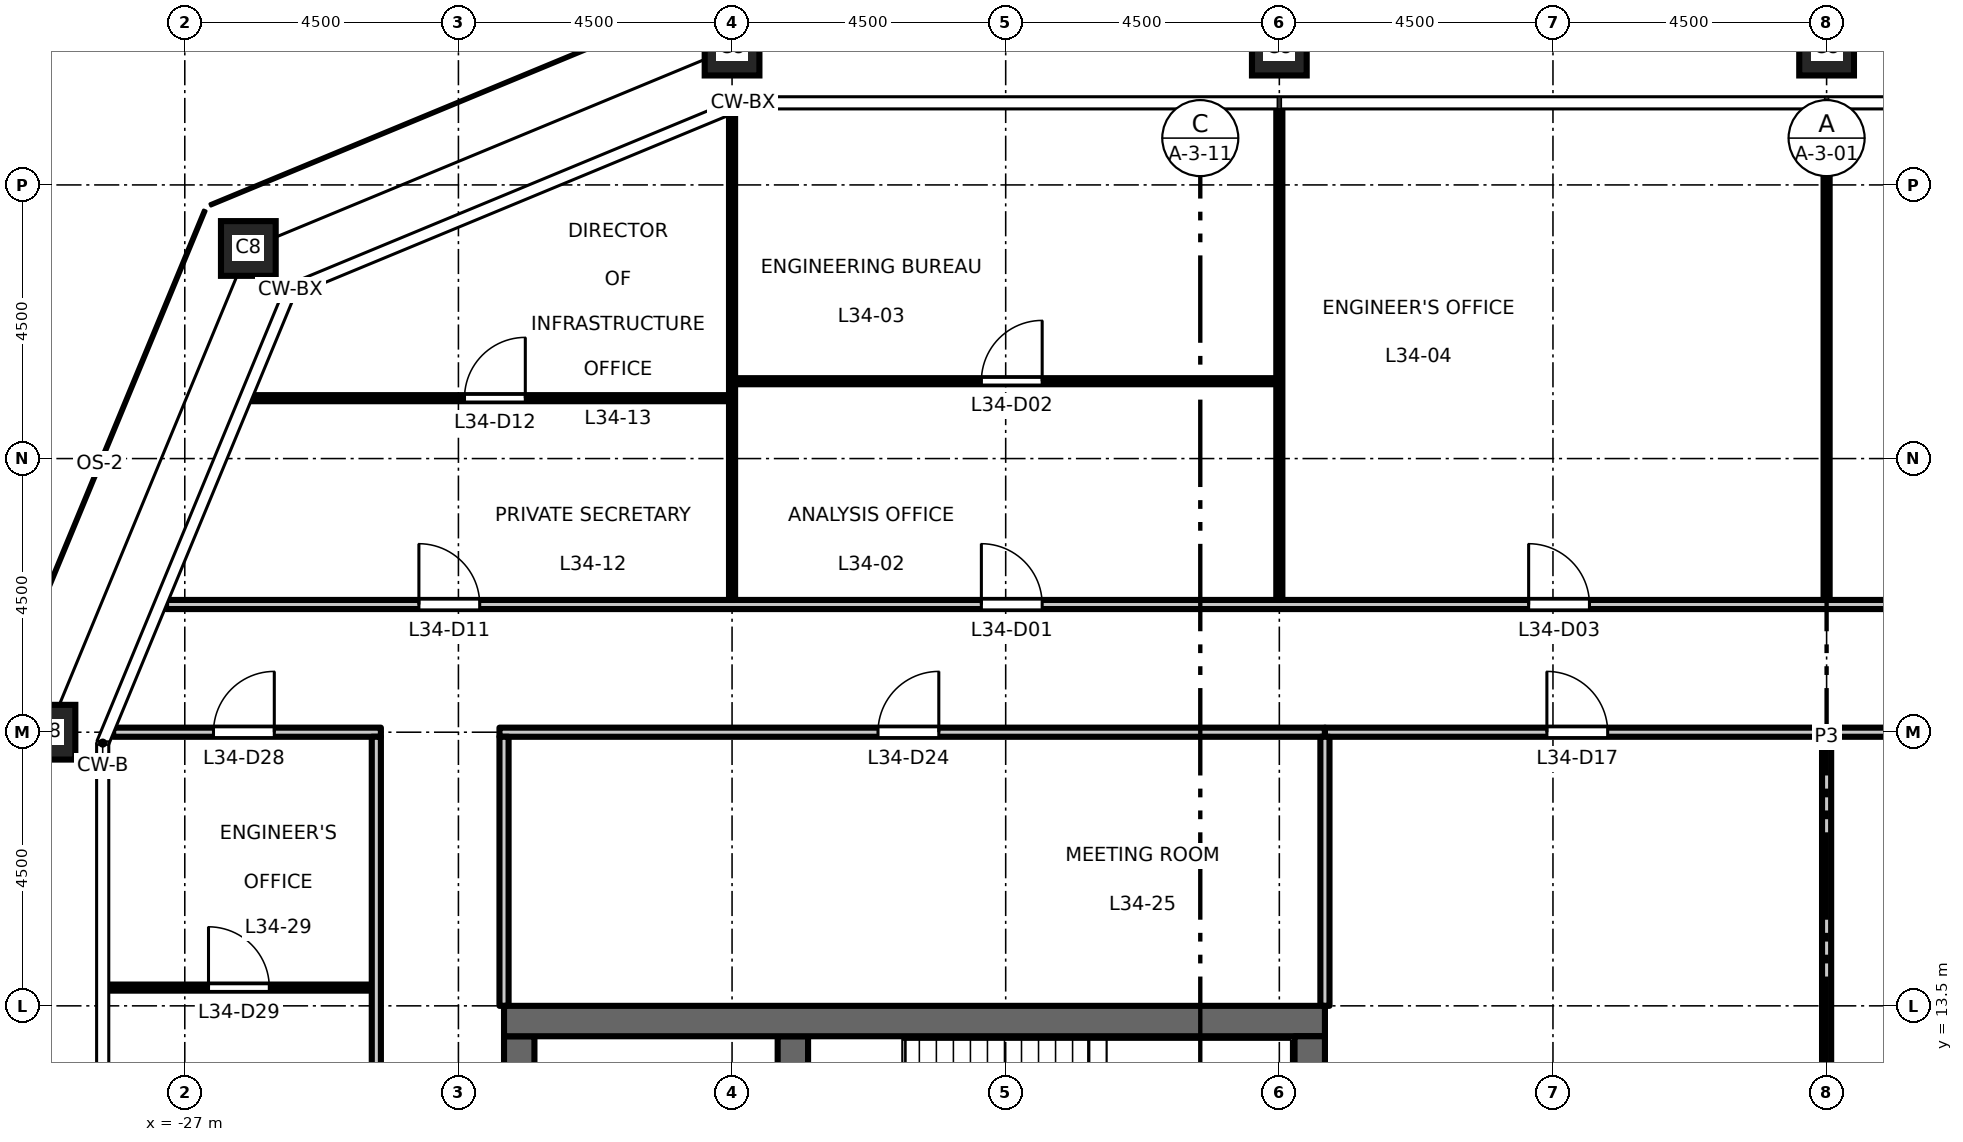
"""IFC4 building model, lengths in metres.
Left out: names, types, materials, properties, quantities, classifications, styles, units other than length and angle.
Written with IfcOpenShell. Run it as: python <this file> out.ifc"""

import sys

from ifc_helpers import new_model, si_unit, direction, frame, frame_2d, origin, origin_2d, place, context, subcontext, project, spatial, rectangle, hollow_rectangle, extrude, element, fill, save


model = new_model("IFC4")
c1 = context("Model", 3, precision=1e-05, world=origin(), true_north=direction((0.0, 1.0)))
c2 = subcontext(c1, "Body", "Model", "MODEL_VIEW")
j1 = project(units=[si_unit("LENGTHUNIT", "METRE"), si_unit("PLANEANGLEUNIT", "RADIAN")], contexts=[c1])
p1 = place(None, origin())
s1 = spatial("IfcSite", under=j1, at=p1, CompositionType="ELEMENT")
p2 = place(p1, origin())
s2 = spatial("IfcBuilding", under=s1, at=p2, CompositionType="ELEMENT")
p3 = place(p2, frame((0.0, 0.0, 158.7)))
s3 = spatial("IfcBuildingStorey", under=s2, at=p3, CompositionType="ELEMENT", Elevation=158.7)
for number, where, z_axis, x_axis in (
    (1, (0.0, 29.25, 0.0), (0.0, 0.0, 1.0), (1.0, 0.0, 0.0)),
    (2, (-9.0, 29.25, 0.0), (0.0, 0.0, 1.0), (1.0, 0.0, 0.0)),
    (3, (-18.0, 29.25, 0.0), (0.0, 0.0, 1.0), (1.0, 0.0, 0.0)),
    (4, (-25.955, 25.955, 0.0), (0.0, 0.0, 1.0), (1.0, 0.0, 0.0)),
    (5, (-29.25, 18.0, 0.0), (0.0, 0.0, 1.0), (1.0, 0.0, 0.0)),
):
    element("IfcColumn", number, at=place(p3, frame(where, z_axis=z_axis, x_axis=x_axis)), inside=s3, PredefinedType="COLUMN", context=c2, shape_type="SweptSolid", body=[
        extrude(hollow_rectangle(XDim=0.9, YDim=0.9, WallThickness=0.05, at=origin_2d()), origin(), (0.0, 0.0, 1.0), 4.5),
    ])
p4 = place(p3, frame((-21.5, -13.0, 0.0), z_axis=(0.0, 0.0, 1.0), x_axis=(0.0, 1.0, 0.0)))
e6 = element("IfcWall", 6, at=p4, inside=s3, PredefinedType="SHEAR", context=c2, shape_type="SweptSolid", body=[
    extrude(rectangle(XDim=26.0, YDim=0.5, at=frame_2d((13.0, 0.0))), origin(), (0.0, 0.0, 1.0), 4.35),
])
p5 = place(p4, frame((16.825, 0.0, 0.0)))
e7 = element("IfcOpeningElement", 7, at=p5, cuts=e6, PredefinedType="OPENING", context=c2, shape_type="SweptSolid", body=[
    extrude(rectangle(XDim=1.8, YDim=2.1, at=frame_2d((0.9, 1.05))), frame((0.0, 0.26, 0.0), z_axis=(0.0, -1.0, 0.0), x_axis=(1.0, 0.0, 0.0)), (0.0, 0.0, 1.0), 0.52),
])
p6 = place(p4, frame((7.375, 0.0, 0.0)))
e8 = element("IfcOpeningElement", 8, at=p6, cuts=e6, PredefinedType="OPENING", context=c2, shape_type="SweptSolid", body=[
    extrude(rectangle(XDim=1.8, YDim=2.1, at=frame_2d((0.9, 1.05))), frame((0.0, 0.26, 0.0), z_axis=(0.0, -1.0, 0.0), x_axis=(1.0, 0.0, 0.0)), (0.0, 0.0, 1.0), 0.52),
])
p7 = place(p4, frame((1.3, 0.0, 0.0)))
e9 = element("IfcOpeningElement", 9, at=p7, cuts=e6, PredefinedType="OPENING", context=c2, shape_type="SweptSolid", body=[
    extrude(rectangle(XDim=0.9, YDim=2.1, at=frame_2d((0.45, 1.05))), frame((0.0, 0.26, 0.0), z_axis=(0.0, -1.0, 0.0), x_axis=(1.0, 0.0, 0.0)), (0.0, 0.0, 1.0), 0.52),
])
p8 = place(p3, frame((-17.0, 6.425, 0.0), z_axis=(0.0, 0.0, 1.0), x_axis=(0.0, 1.0, 0.0)))
e10 = element("IfcWall", 10, at=p8, inside=s3, PredefinedType="SHEAR", context=c2, shape_type="SweptSolid", body=[
    extrude(rectangle(XDim=6.575, YDim=0.5, at=frame_2d((3.288, 0.0))), origin(), (0.0, 0.0, 1.0), 4.35),
])
p9 = place(p3, frame((-8.25, 13.25, 0.0), z_axis=(0.0, 0.0, 1.0), x_axis=(-1.0, 0.0, 0.0)))
e11 = element("IfcWall", 11, at=p9, inside=s3, PredefinedType="SHEAR", context=c2, shape_type="SweptSolid", body=[
    extrude(rectangle(XDim=13.5, YDim=0.5, at=frame_2d((6.75, 0.0))), origin(), (0.0, 0.0, 1.0), 4.35),
])
p10 = place(p3, frame((-8.5, -13.0, 0.0), z_axis=(0.0, 0.0, 1.0), x_axis=(0.0, 1.0, 0.0)))
e12 = element("IfcWall", 12, at=p10, inside=s3, PredefinedType="SHEAR", context=c2, shape_type="SweptSolid", body=[
    extrude(rectangle(XDim=26.0, YDim=0.5, at=frame_2d((13.0, 0.0))), origin(), (0.0, 0.0, 1.0), 4.35),
])
p11 = place(p3, frame((-28.26, 13.8, 0.0), z_axis=(0.0, 0.0, 1.0), x_axis=(1.0, 0.0, 0.0)))
e13 = element("IfcWall", 13, at=p11, inside=s3, PredefinedType="PARTITIONING", context=c2, shape_type="SweptSolid", body=[
    extrude(rectangle(XDim=4.335, YDim=0.1, at=frame_2d((2.167, 0.0))), origin(), (0.0, 0.0, 1.0), 4.35),
])
p12 = place(p11, frame((1.65, 0.0, 0.0)))
e14 = element("IfcOpeningElement", 14, at=p12, cuts=e13, PredefinedType="OPENING", context=c2, shape_type="SweptSolid", body=[
    extrude(rectangle(XDim=1.0, YDim=2.1, at=frame_2d((0.5, 1.05))), frame((0.0, 0.06, 0.0), z_axis=(0.0, -1.0, 0.0), x_axis=(1.0, 0.0, 0.0)), (0.0, 0.0, 1.0), 0.12),
])
p13 = place(p3, frame((-28.178, 18.0, 0.0), z_axis=(0.0, 0.0, 1.0), x_axis=(1.0, 0.0, 0.0)))
e15 = element("IfcWall", 15, at=p13, inside=s3, PredefinedType="PARTITIONING", context=c2, shape_type="SweptSolid", body=[
    extrude(rectangle(XDim=4.403, YDim=0.15, at=frame_2d((2.202, 0.0))), origin(), (0.0, 0.0, 1.0), 4.35),
])
p14 = place(p13, frame((1.65, 0.0, 0.0)))
e16 = element("IfcOpeningElement", 16, at=p14, cuts=e15, PredefinedType="OPENING", context=c2, shape_type="SweptSolid", body=[
    extrude(rectangle(XDim=1.0, YDim=2.1, at=frame_2d((0.5, 1.05))), frame((0.0, 0.085, 0.0), z_axis=(0.0, -1.0, 0.0), x_axis=(1.0, 0.0, 0.0)), (0.0, 0.0, 1.0), 0.17),
])
p15 = place(p3, frame((-21.825, 18.0, 0.0), z_axis=(0.0, 0.0, 1.0), x_axis=(1.0, 0.0, 0.0)))
e17 = element("IfcWall", 17, at=p15, inside=s3, PredefinedType="PARTITIONING", context=c2, shape_type="SweptSolid", body=[
    extrude(rectangle(XDim=13.575, YDim=0.15, at=frame_2d((6.788, 0.0))), origin(), (0.0, 0.0, 1.0), 4.35),
])
p16 = place(p15, frame((6.225, 0.0, 0.0)))
e18 = element("IfcOpeningElement", 18, at=p16, cuts=e17, PredefinedType="OPENING", context=c2, shape_type="SweptSolid", body=[
    extrude(rectangle(XDim=1.0, YDim=2.1, at=frame_2d((0.5, 1.05))), frame((0.0, 0.085, 0.0), z_axis=(0.0, -1.0, 0.0), x_axis=(1.0, 0.0, 0.0)), (0.0, 0.0, 1.0), 0.17),
])
p17 = place(p3, frame((0.0, 18.0, 0.0), z_axis=(0.0, 0.0, 1.0), x_axis=(1.0, 0.0, 0.0)))
e19 = element("IfcWall", 19, at=p17, inside=s3, PredefinedType="PARTITIONING", context=c2, shape_type="SweptSolid", body=[
    extrude(rectangle(XDim=21.825, YDim=0.15, at=frame_2d((10.913, 0.0))), origin(), (0.0, 0.0, 1.0), 4.35),
])
p18 = place(p17, frame((3.65, 0.0, 0.0)))
e20 = element("IfcOpeningElement", 20, at=p18, cuts=e19, PredefinedType="OPENING", context=c2, shape_type="SweptSolid", body=[
    extrude(rectangle(XDim=1.0, YDim=2.1, at=frame_2d((0.5, 1.05))), frame((0.0, 0.085, 0.0), z_axis=(0.0, -1.0, 0.0), x_axis=(1.0, 0.0, 0.0)), (0.0, 0.0, 1.0), 0.17),
])
p19 = place(p17, frame((14.4, 0.0, 0.0)))
e21 = element("IfcOpeningElement", 21, at=p19, cuts=e19, PredefinedType="OPENING", context=c2, shape_type="SweptSolid", body=[
    extrude(rectangle(XDim=1.0, YDim=2.1, at=frame_2d((0.5, 1.05))), frame((0.0, 0.085, 0.0), z_axis=(0.0, -1.0, 0.0), x_axis=(1.0, 0.0, 0.0)), (0.0, 0.0, 1.0), 0.17),
])
p20 = place(p3, frame((-8.25, 18.0, 0.0), z_axis=(0.0, 0.0, 1.0), x_axis=(1.0, 0.0, 0.0)))
e22 = element("IfcWall", 22, at=p20, inside=s3, PredefinedType="PARTITIONING", context=c2, shape_type="SweptSolid", body=[
    extrude(rectangle(XDim=8.25, YDim=0.15, at=frame_2d((4.125, 0.0))), origin(), (0.0, 0.0, 1.0), 4.35),
])
p21 = place(p20, frame((3.65, 0.0, 0.0)))
e23 = element("IfcOpeningElement", 23, at=p21, cuts=e22, PredefinedType="OPENING", context=c2, shape_type="SweptSolid", body=[
    extrude(rectangle(XDim=1.0, YDim=2.1, at=frame_2d((0.5, 1.05))), frame((0.0, 0.085, 0.0), z_axis=(0.0, -1.0, 0.0), x_axis=(1.0, 0.0, 0.0)), (0.0, 0.0, 1.0), 0.17),
])
p22 = place(p3, frame((-27.308, 20.1, 0.0), z_axis=(0.0, 0.0, 1.0), x_axis=(1.0, 0.0, 0.0)))
e24 = element("IfcWall", 24, at=p22, inside=s3, PredefinedType="PARTITIONING", context=c2, shape_type="SweptSolid", body=[
    extrude(rectangle(XDim=54.616, YDim=0.15, at=frame_2d((27.308, 0.0))), origin(), (0.0, 0.0, 1.0), 4.35),
])
p23 = place(p22, frame((13.408, 0.0, 0.0)))
e25 = element("IfcOpeningElement", 25, at=p23, cuts=e24, PredefinedType="OPENING", context=c2, shape_type="SweptSolid", body=[
    extrude(rectangle(XDim=1.0, YDim=2.1, at=frame_2d((0.5, 1.05))), frame((0.0, 0.085, 0.0), z_axis=(0.0, -1.0, 0.0), x_axis=(1.0, 0.0, 0.0)), (0.0, 0.0, 1.0), 0.17),
])
p24 = place(p22, frame((22.408, 0.0, 0.0)))
e26 = element("IfcOpeningElement", 26, at=p24, cuts=e24, PredefinedType="OPENING", context=c2, shape_type="SweptSolid", body=[
    extrude(rectangle(XDim=1.0, YDim=2.1, at=frame_2d((0.5, 1.05))), frame((0.0, 0.085, 0.0), z_axis=(0.0, -1.0, 0.0), x_axis=(1.0, 0.0, 0.0)), (0.0, 0.0, 1.0), 0.17),
])
p25 = place(p22, frame((31.408, 0.0, 0.0)))
e27 = element("IfcOpeningElement", 27, at=p25, cuts=e24, PredefinedType="OPENING", context=c2, shape_type="SweptSolid", body=[
    extrude(rectangle(XDim=1.0, YDim=2.1, at=frame_2d((0.5, 1.05))), frame((0.0, 0.085, 0.0), z_axis=(0.0, -1.0, 0.0), x_axis=(1.0, 0.0, 0.0)), (0.0, 0.0, 1.0), 0.17),
])
p26 = place(p22, frame((40.408, 0.0, 0.0)))
e28 = element("IfcOpeningElement", 28, at=p26, cuts=e24, PredefinedType="OPENING", context=c2, shape_type="SweptSolid", body=[
    extrude(rectangle(XDim=1.0, YDim=2.1, at=frame_2d((0.5, 1.05))), frame((0.0, 0.085, 0.0), z_axis=(0.0, -1.0, 0.0), x_axis=(1.0, 0.0, 0.0)), (0.0, 0.0, 1.0), 0.17),
])
p27 = place(p22, frame((4.158, 0.0, 0.0)))
e29 = element("IfcOpeningElement", 29, at=p27, cuts=e24, PredefinedType="OPENING", context=c2, shape_type="SweptSolid", body=[
    extrude(rectangle(XDim=1.0, YDim=2.1, at=frame_2d((0.5, 1.05))), frame((0.0, 0.085, 0.0), z_axis=(0.0, -1.0, 0.0), x_axis=(1.0, 0.0, 0.0)), (0.0, 0.0, 1.0), 0.17),
])
p28 = place(p22, frame((49.466, 0.0, 0.0)))
e30 = element("IfcOpeningElement", 30, at=p28, cuts=e24, PredefinedType="OPENING", context=c2, shape_type="SweptSolid", body=[
    extrude(rectangle(XDim=1.0, YDim=2.1, at=frame_2d((0.5, 1.05))), frame((0.0, 0.085, 0.0), z_axis=(0.0, -1.0, 0.0), x_axis=(1.0, 0.0, 0.0)), (0.0, 0.0, 1.0), 0.17),
])
p29 = place(p3, frame((-25.903, 23.493, 0.0), z_axis=(0.0, 0.0, 1.0), x_axis=(1.0, 0.0, 0.0)))
e31 = element("IfcWall", 31, at=p29, inside=s3, PredefinedType="PARTITIONING", context=c2, shape_type="SweptSolid", body=[
    extrude(rectangle(XDim=7.853, YDim=0.1, at=frame_2d((3.927, 0.0))), origin(), (0.0, 0.0, 1.0), 4.35),
])
p30 = place(p29, frame((3.503, 0.0, 0.0)))
e32 = element("IfcOpeningElement", 32, at=p30, cuts=e31, PredefinedType="OPENING", context=c2, shape_type="SweptSolid", body=[
    extrude(rectangle(XDim=1.0, YDim=2.1, at=frame_2d((0.5, 1.05))), frame((0.0, 0.06, 0.0), z_axis=(0.0, -1.0, 0.0), x_axis=(1.0, 0.0, 0.0)), (0.0, 0.0, 1.0), 0.12),
])
p31 = place(p3, frame((-17.95, 23.772, 0.0), z_axis=(0.0, 0.0, 1.0), x_axis=(1.0, 0.0, 0.0)))
e33 = element("IfcWall", 33, at=p31, inside=s3, PredefinedType="PARTITIONING", context=c2, shape_type="SweptSolid", body=[
    extrude(rectangle(XDim=8.9, YDim=0.1, at=frame_2d((4.45, 0.0))), origin(), (0.0, 0.0, 1.0), 4.35),
])
p32 = place(p31, frame((4.05, 0.0, 0.0)))
e34 = element("IfcOpeningElement", 34, at=p32, cuts=e33, PredefinedType="OPENING", context=c2, shape_type="SweptSolid", body=[
    extrude(rectangle(XDim=1.0, YDim=2.1, at=frame_2d((0.5, 1.05))), frame((0.0, 0.06, 0.0), z_axis=(0.0, -1.0, 0.0), x_axis=(1.0, 0.0, 0.0)), (0.0, 0.0, 1.0), 0.12),
])
p33 = place(p3, frame((-23.85, -17.925, 0.0), z_axis=(0.0, 0.0, 1.0), x_axis=(0.0, 1.0, 0.0)))
e35 = element("IfcWall", 35, at=p33, inside=s3, PredefinedType="PARTITIONING", context=c2, shape_type="SweptSolid", body=[
    extrude(rectangle(XDim=35.85, YDim=0.15, at=frame_2d((17.925, 0.0))), origin(), (0.0, 0.0, 1.0), 4.35),
])
p34 = place(p3, frame((-21.75, 13.5, 0.0), z_axis=(0.0, 0.0, 1.0), x_axis=(0.0, 1.0, 0.0)))
e36 = element("IfcWall", 36, at=p34, inside=s3, PredefinedType="PARTITIONING", context=c2, shape_type="SweptSolid", body=[
    extrude(rectangle(XDim=4.425, YDim=0.15, at=frame_2d((2.212, 0.0))), origin(), (0.0, 0.0, 1.0), 4.35),
])
p35 = place(p3, frame((-18.0, 20.175, 0.0), z_axis=(0.0, 0.0, 1.0), x_axis=(0.0, 1.0, 0.0)))
e37 = element("IfcWall", 37, at=p35, inside=s3, PredefinedType="PARTITIONING", context=c2, shape_type="SweptSolid", body=[
    extrude(rectangle(XDim=8.003, YDim=0.1, at=frame_2d((4.001, 0.0))), origin(), (0.0, 0.0, 1.0), 3.45),
])
p36 = place(p3, frame((-9.0, 20.175, 0.0), z_axis=(0.0, 0.0, 1.0), x_axis=(0.0, 1.0, 0.0)))
e38 = element("IfcWall", 38, at=p36, inside=s3, PredefinedType="PARTITIONING", context=c2, shape_type="SweptSolid", body=[
    extrude(rectangle(XDim=8.085, YDim=0.1, at=frame_2d((4.042, 0.0))), origin(), (0.0, 0.0, 1.0), 3.45),
])
p37 = place(p3, frame((-8.25, 13.5, 0.0), z_axis=(0.0, 0.0, 1.0), x_axis=(0.0, 1.0, 0.0)))
e39 = element("IfcWall", 39, at=p37, inside=s3, PredefinedType="PARTITIONING", context=c2, shape_type="SweptSolid", body=[
    extrude(rectangle(XDim=4.425, YDim=0.15, at=frame_2d((2.212, 0.0))), origin(), (0.0, 0.0, 1.0), 4.35),
])
p38 = place(p3, frame((0.0, 20.175, 0.0), z_axis=(0.0, 0.0, 1.0), x_axis=(0.0, 1.0, 0.0)))
e40 = element("IfcWall", 40, at=p38, inside=s3, PredefinedType="PARTITIONING", context=c2, shape_type="SweptSolid", body=[
    extrude(rectangle(XDim=8.085, YDim=0.1, at=frame_2d((4.042, 0.0))), origin(), (0.0, 0.0, 1.0), 3.45),
])
p39 = place(p3, frame((0.0, 8.65, 0.0), z_axis=(0.0, 0.0, 1.0), x_axis=(0.0, 1.0, 0.0)))
e41 = element("IfcWall", 41, at=p39, inside=s3, PredefinedType="PARTITIONING", context=c2, shape_type="SweptSolid", body=[
    extrude(rectangle(XDim=9.275, YDim=0.15, at=frame_2d((4.638, 0.0))), origin(), (0.0, 0.0, 1.0), 3.45),
])
p40 = place(p23, origin())
e42 = element("IfcDoor", 42, at=p40, inside=s3, OperationType="SINGLE_SWING_LEFT", PredefinedType="DOOR", context=c2, shape_type="SweptSolid", body=[
    extrude(rectangle(XDim=1.0, YDim=2.1, at=frame_2d((0.5, 1.05))), frame((0.0, 0.025, 0.0), z_axis=(0.0, -1.0, 0.0), x_axis=(1.0, 0.0, 0.0)), (0.0, 0.0, 1.0), 0.05),
])
fill(e25, e42)
p41 = place(p32, origin())
e43 = element("IfcDoor", 43, at=p41, inside=s3, OperationType="SINGLE_SWING_RIGHT", PredefinedType="DOOR", context=c2, shape_type="SweptSolid", body=[
    extrude(rectangle(XDim=1.0, YDim=2.1, at=frame_2d((0.5, 1.05))), frame((0.0, 0.025, 0.0), z_axis=(0.0, -1.0, 0.0), x_axis=(1.0, 0.0, 0.0)), (0.0, 0.0, 1.0), 0.05),
])
fill(e34, e43)
p42 = place(p24, origin())
e44 = element("IfcDoor", 44, at=p42, inside=s3, OperationType="SINGLE_SWING_LEFT", PredefinedType="DOOR", context=c2, shape_type="SweptSolid", body=[
    extrude(rectangle(XDim=1.0, YDim=2.1, at=frame_2d((0.5, 1.05))), frame((0.0, 0.025, 0.0), z_axis=(0.0, -1.0, 0.0), x_axis=(1.0, 0.0, 0.0)), (0.0, 0.0, 1.0), 0.05),
])
fill(e26, e44)
p43 = place(p27, origin())
e45 = element("IfcDoor", 45, at=p43, inside=s3, OperationType="SINGLE_SWING_LEFT", PredefinedType="DOOR", context=c2, shape_type="SweptSolid", body=[
    extrude(rectangle(XDim=1.0, YDim=2.1, at=frame_2d((0.5, 1.05))), frame((0.0, 0.025, 0.0), z_axis=(0.0, -1.0, 0.0), x_axis=(1.0, 0.0, 0.0)), (0.0, 0.0, 1.0), 0.05),
])
fill(e29, e45)
p44 = place(p30, origin())
e46 = element("IfcDoor", 46, at=p44, inside=s3, OperationType="SINGLE_SWING_RIGHT", PredefinedType="DOOR", context=c2, shape_type="SweptSolid", body=[
    extrude(rectangle(XDim=1.0, YDim=2.1, at=frame_2d((0.5, 1.05))), frame((0.0, 0.025, 0.0), z_axis=(0.0, -1.0, 0.0), x_axis=(1.0, 0.0, 0.0)), (0.0, 0.0, 1.0), 0.05),
])
fill(e32, e46)
p45 = place(p21, origin())
e47 = element("IfcDoor", 47, at=p45, inside=s3, OperationType="SINGLE_SWING_LEFT", PredefinedType="DOOR", context=c2, shape_type="SweptSolid", body=[
    extrude(rectangle(XDim=1.0, YDim=2.1, at=frame_2d((0.5, 1.05))), frame((0.0, 0.025, 0.0), z_axis=(0.0, -1.0, 0.0), x_axis=(1.0, 0.0, 0.0)), (0.0, 0.0, 1.0), 0.05),
])
fill(e23, e47)
p46 = place(p16, origin())
e48 = element("IfcDoor", 48, at=p46, inside=s3, OperationType="SINGLE_SWING_RIGHT", PredefinedType="DOOR", context=c2, shape_type="SweptSolid", body=[
    extrude(rectangle(XDim=1.0, YDim=2.1, at=frame_2d((0.5, 1.05))), frame((0.0, 0.025, 0.0), z_axis=(0.0, -1.0, 0.0), x_axis=(1.0, 0.0, 0.0)), (0.0, 0.0, 1.0), 0.05),
])
fill(e18, e48)
p47 = place(p14, origin())
e49 = element("IfcDoor", 49, at=p47, inside=s3, OperationType="SINGLE_SWING_RIGHT", PredefinedType="DOOR", context=c2, shape_type="SweptSolid", body=[
    extrude(rectangle(XDim=1.0, YDim=2.1, at=frame_2d((0.5, 1.05))), frame((0.0, 0.025, 0.0), z_axis=(0.0, -1.0, 0.0), x_axis=(1.0, 0.0, 0.0)), (0.0, 0.0, 1.0), 0.05),
])
fill(e16, e49)
p48 = place(p12, origin())
e50 = element("IfcDoor", 50, at=p48, inside=s3, OperationType="SINGLE_SWING_LEFT", PredefinedType="DOOR", context=c2, shape_type="SweptSolid", body=[
    extrude(rectangle(XDim=1.0, YDim=2.1, at=frame_2d((0.5, 1.05))), frame((0.0, 0.025, 0.0), z_axis=(0.0, -1.0, 0.0), x_axis=(1.0, 0.0, 0.0)), (0.0, 0.0, 1.0), 0.05),
])
fill(e14, e50)
save(model, sys.argv[1])
